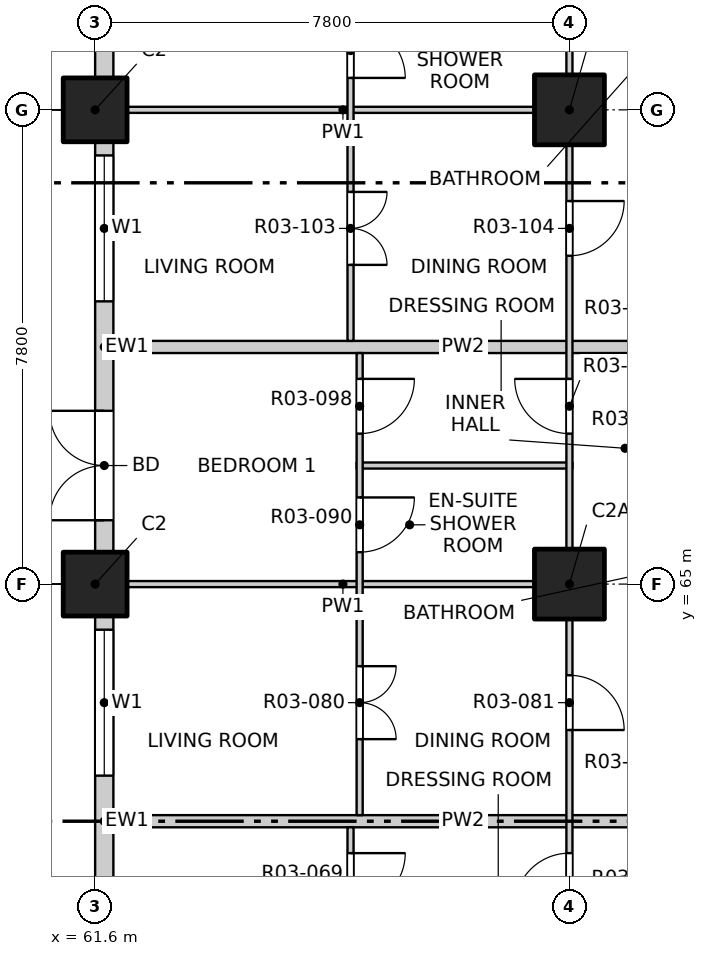
"""IFC4 building model, lengths in metres.
Left out: names, types, materials, properties, quantities, classifications, styles, units other than length and angle.
Written with IfcOpenShell. Run it as: python <this file> out.ifc"""

import sys

from ifc_helpers import new_model, si_unit, direction, frame, frame_2d, origin, origin_2d, place, context, subcontext, project, spatial, rectangle, extrude, element, fill, save


model = new_model("IFC4")
c1 = context("Model", 3, precision=1e-05, world=origin(), true_north=direction((0.0, 1.0)))
c2 = subcontext(c1, "Body", "Model", "MODEL_VIEW")
j1 = project(units=[si_unit("LENGTHUNIT", "METRE"), si_unit("PLANEANGLEUNIT", "RADIAN")], contexts=[c1])
p1 = place(None, origin())
s1 = spatial("IfcSite", under=j1, at=p1, CompositionType="ELEMENT")
p2 = place(p1, origin())
s2 = spatial("IfcBuilding", under=s1, at=p2, CompositionType="ELEMENT")
p3 = place(p2, frame((0.0, 0.0, 43.3)))
s3 = spatial("IfcBuildingStorey", under=s2, at=p3, CompositionType="ELEMENT", Elevation=43.3)
for number, where, z_axis, x_axis in (
    (1, (61.6, 65.0, -0.25), (0.0, 0.0, 1.0), (1.0, 0.0, 0.0)),
    (2, (61.6, 72.8, -0.25), (0.0, 0.0, 1.0), (1.0, 0.0, 0.0)),
):
    element("IfcColumn", number, at=place(p3, frame(where, z_axis=z_axis, x_axis=x_axis)), inside=s3, PredefinedType="COLUMN", context=c2, shape_type="SweptSolid", body=[
        extrude(rectangle(XDim=1.05, YDim=1.05, at=origin_2d()), origin(), (0.0, 0.0, 1.0), 3.35),
    ])
for number, where, z_axis, x_axis in (
    (3, (69.4, 65.0, -0.25), (0.0, 0.0, 1.0), (1.0, 0.0, 0.0)),
    (4, (69.4, 72.8, -0.25), (0.0, 0.0, 1.0), (1.0, 0.0, 0.0)),
):
    element("IfcColumn", number, at=place(p3, frame(where, z_axis=z_axis, x_axis=x_axis)), inside=s3, PredefinedType="COLUMN", context=c2, shape_type="SweptSolid", body=[
        extrude(rectangle(XDim=1.15, YDim=1.15, at=origin_2d()), origin(), (0.0, 0.0, 1.0), 3.35),
    ])
p4 = place(p3, frame((61.75, 57.725, 0.0), z_axis=(0.0, 0.0, 1.0), x_axis=(0.0, 1.0, 0.0)))
e5 = element("IfcWall", 5, at=p4, inside=s3, PredefinedType="SOLIDWALL", context=c2, shape_type="SweptSolid", body=[
    extrude(rectangle(XDim=6.75, YDim=0.3, at=frame_2d((3.375, 0.0))), origin(), (0.0, 0.0, 1.0), 3.1),
])
p5 = place(p4, frame((0.525, 0.0, 0.0)))
e6 = element("IfcOpeningElement", 6, at=p5, cuts=e5, PredefinedType="OPENING", context=c2, shape_type="SweptSolid", body=[
    extrude(rectangle(XDim=1.8, YDim=2.4, at=frame_2d((0.9, 1.2))), frame((0.0, 0.16, 0.0), z_axis=(0.0, -1.0, 0.0), x_axis=(1.0, 0.0, 0.0)), (0.0, 0.0, 1.0), 0.32),
])
p6 = place(p4, frame((4.125, 0.0, 0.9)))
e7 = element("IfcOpeningElement", 7, at=p6, cuts=e5, PredefinedType="OPENING", context=c2, shape_type="SweptSolid", body=[
    extrude(rectangle(XDim=2.4, YDim=1.8, at=frame_2d((1.2, 0.9))), frame((0.0, 0.16, 0.0), z_axis=(0.0, -1.0, 0.0), x_axis=(1.0, 0.0, 0.0)), (0.0, 0.0, 1.0), 0.32),
])
p7 = place(p3, frame((61.75, 65.525, 0.0), z_axis=(0.0, 0.0, 1.0), x_axis=(0.0, 1.0, 0.0)))
e8 = element("IfcWall", 8, at=p7, inside=s3, PredefinedType="SOLIDWALL", context=c2, shape_type="SweptSolid", body=[
    extrude(rectangle(XDim=6.75, YDim=0.3, at=frame_2d((3.375, 0.0))), origin(), (0.0, 0.0, 1.0), 3.1),
])
p8 = place(p7, frame((0.525, 0.0, 0.0)))
e9 = element("IfcOpeningElement", 9, at=p8, cuts=e8, PredefinedType="OPENING", context=c2, shape_type="SweptSolid", body=[
    extrude(rectangle(XDim=1.8, YDim=2.4, at=frame_2d((0.9, 1.2))), frame((0.0, 0.16, 0.0), z_axis=(0.0, -1.0, 0.0), x_axis=(1.0, 0.0, 0.0)), (0.0, 0.0, 1.0), 0.32),
])
p9 = place(p7, frame((4.125, 0.0, 0.9)))
e10 = element("IfcOpeningElement", 10, at=p9, cuts=e8, PredefinedType="OPENING", context=c2, shape_type="SweptSolid", body=[
    extrude(rectangle(XDim=2.4, YDim=1.8, at=frame_2d((1.2, 0.9))), frame((0.0, 0.16, 0.0), z_axis=(0.0, -1.0, 0.0), x_axis=(1.0, 0.0, 0.0)), (0.0, 0.0, 1.0), 0.32),
])
p10 = place(p3, frame((61.75, 73.325, 0.0), z_axis=(0.0, 0.0, 1.0), x_axis=(0.0, 1.0, 0.0)))
e11 = element("IfcWall", 11, at=p10, inside=s3, PredefinedType="SOLIDWALL", context=c2, shape_type="SweptSolid", body=[
    extrude(rectangle(XDim=6.75, YDim=0.3, at=frame_2d((3.375, 0.0))), origin(), (0.0, 0.0, 1.0), 3.1),
])
p11 = place(p10, frame((0.525, 0.0, 0.0)))
e12 = element("IfcOpeningElement", 12, at=p11, cuts=e11, PredefinedType="OPENING", context=c2, shape_type="SweptSolid", body=[
    extrude(rectangle(XDim=1.8, YDim=2.4, at=frame_2d((0.9, 1.2))), frame((0.0, 0.16, 0.0), z_axis=(0.0, -1.0, 0.0), x_axis=(1.0, 0.0, 0.0)), (0.0, 0.0, 1.0), 0.32),
])
p12 = place(p10, frame((4.125, 0.0, 0.9)))
e13 = element("IfcOpeningElement", 13, at=p12, cuts=e11, PredefinedType="OPENING", context=c2, shape_type="SweptSolid", body=[
    extrude(rectangle(XDim=2.4, YDim=1.8, at=frame_2d((1.2, 0.9))), frame((0.0, 0.16, 0.0), z_axis=(0.0, -1.0, 0.0), x_axis=(1.0, 0.0, 0.0)), (0.0, 0.0, 1.0), 0.32),
])
p13 = place(p3, frame((61.9, 61.1, 0.0), z_axis=(0.0, 0.0, 1.0), x_axis=(1.0, 0.0, 0.0)))
e14 = element("IfcWall", 14, at=p13, inside=s3, PredefinedType="PARTITIONING", context=c2, shape_type="SweptSolid", body=[
    extrude(rectangle(XDim=11.5, YDim=0.2, at=frame_2d((5.75, 0.0))), origin(), (0.0, 0.0, 1.0), 3.1),
])
p14 = place(p3, frame((61.9, 65.0, 0.0), z_axis=(0.0, 0.0, 1.0), x_axis=(1.0, 0.0, 0.0)))
e15 = element("IfcWall", 15, at=p14, inside=s3, PredefinedType="PARTITIONING", context=c2, shape_type="SweptSolid", body=[
    extrude(rectangle(XDim=7.55, YDim=0.1, at=frame_2d((3.775, 0.0))), origin(), (0.0, 0.0, 1.0), 3.1),
])
p15 = place(p3, frame((65.9, 66.95, 0.0), z_axis=(0.0, 0.0, 1.0), x_axis=(1.0, 0.0, 0.0)))
e16 = element("IfcWall", 16, at=p15, inside=s3, PredefinedType="PARTITIONING", context=c2, shape_type="SweptSolid", body=[
    extrude(rectangle(XDim=3.55, YDim=0.1, at=frame_2d((1.775, 0.0))), origin(), (0.0, 0.0, 1.0), 3.1),
])
p16 = place(p3, frame((61.9, 68.9, 0.0), z_axis=(0.0, 0.0, 1.0), x_axis=(1.0, 0.0, 0.0)))
e17 = element("IfcWall", 17, at=p16, inside=s3, PredefinedType="PARTITIONING", context=c2, shape_type="SweptSolid", body=[
    extrude(rectangle(XDim=11.5, YDim=0.2, at=frame_2d((5.75, 0.0))), origin(), (0.0, 0.0, 1.0), 3.1),
])
p17 = place(p3, frame((61.9, 72.8, 0.0), z_axis=(0.0, 0.0, 1.0), x_axis=(1.0, 0.0, 0.0)))
e18 = element("IfcWall", 18, at=p17, inside=s3, PredefinedType="PARTITIONING", context=c2, shape_type="SweptSolid", body=[
    extrude(rectangle(XDim=7.55, YDim=0.1, at=frame_2d((3.775, 0.0))), origin(), (0.0, 0.0, 1.0), 3.1),
])
p18 = place(p3, frame((65.8, 41.9, 0.0), z_axis=(0.0, 0.0, 1.0), x_axis=(0.0, 1.0, 0.0)))
e19 = element("IfcWall", 19, at=p18, inside=s3, PredefinedType="PARTITIONING", context=c2, shape_type="SweptSolid", body=[
    extrude(rectangle(XDim=19.1, YDim=0.1, at=frame_2d((9.55, 0.0))), origin(), (0.0, 0.0, 1.0), 3.1),
])
p19 = place(p18, frame((1.05, 0.0, 0.0)))
e20 = element("IfcOpeningElement", 20, at=p19, cuts=e19, PredefinedType="OPENING", context=c2, shape_type="SweptSolid", body=[
    extrude(rectangle(XDim=1.2, YDim=2.1, at=frame_2d((0.6, 1.05))), frame((0.0, 0.06, 0.0), z_axis=(0.0, -1.0, 0.0), x_axis=(1.0, 0.0, 0.0)), (0.0, 0.0, 1.0), 0.12),
])
p20 = place(p18, frame((4.125, 0.0, 0.0)))
e21 = element("IfcOpeningElement", 21, at=p20, cuts=e19, PredefinedType="OPENING", context=c2, shape_type="SweptSolid", body=[
    extrude(rectangle(XDim=0.9, YDim=2.1, at=frame_2d((0.45, 1.05))), frame((0.0, 0.06, 0.0), z_axis=(0.0, -1.0, 0.0), x_axis=(1.0, 0.0, 0.0)), (0.0, 0.0, 1.0), 0.12),
])
p21 = place(p18, frame((6.075, 0.0, 0.0)))
e22 = element("IfcOpeningElement", 22, at=p21, cuts=e19, PredefinedType="OPENING", context=c2, shape_type="SweptSolid", body=[
    extrude(rectangle(XDim=0.9, YDim=2.1, at=frame_2d((0.45, 1.05))), frame((0.0, 0.06, 0.0), z_axis=(0.0, -1.0, 0.0), x_axis=(1.0, 0.0, 0.0)), (0.0, 0.0, 1.0), 0.12),
])
p22 = place(p18, frame((8.85, 0.0, 0.0)))
e23 = element("IfcOpeningElement", 23, at=p22, cuts=e19, PredefinedType="OPENING", context=c2, shape_type="SweptSolid", body=[
    extrude(rectangle(XDim=1.2, YDim=2.1, at=frame_2d((0.6, 1.05))), frame((0.0, 0.06, 0.0), z_axis=(0.0, -1.0, 0.0), x_axis=(1.0, 0.0, 0.0)), (0.0, 0.0, 1.0), 0.12),
])
p23 = place(p18, frame((11.925, 0.0, 0.0)))
e24 = element("IfcOpeningElement", 24, at=p23, cuts=e19, PredefinedType="OPENING", context=c2, shape_type="SweptSolid", body=[
    extrude(rectangle(XDim=0.9, YDim=2.1, at=frame_2d((0.45, 1.05))), frame((0.0, 0.06, 0.0), z_axis=(0.0, -1.0, 0.0), x_axis=(1.0, 0.0, 0.0)), (0.0, 0.0, 1.0), 0.12),
])
p24 = place(p18, frame((13.875, 0.0, 0.0)))
e25 = element("IfcOpeningElement", 25, at=p24, cuts=e19, PredefinedType="OPENING", context=c2, shape_type="SweptSolid", body=[
    extrude(rectangle(XDim=0.9, YDim=2.1, at=frame_2d((0.45, 1.05))), frame((0.0, 0.06, 0.0), z_axis=(0.0, -1.0, 0.0), x_axis=(1.0, 0.0, 0.0)), (0.0, 0.0, 1.0), 0.12),
])
p25 = place(p18, frame((15.825, 0.0, 0.0)))
e26 = element("IfcOpeningElement", 26, at=p25, cuts=e19, PredefinedType="OPENING", context=c2, shape_type="SweptSolid", body=[
    extrude(rectangle(XDim=0.9, YDim=2.1, at=frame_2d((0.45, 1.05))), frame((0.0, 0.06, 0.0), z_axis=(0.0, -1.0, 0.0), x_axis=(1.0, 0.0, 0.0)), (0.0, 0.0, 1.0), 0.12),
])
p26 = place(p18, frame((17.775, 0.0, 0.0)))
e27 = element("IfcOpeningElement", 27, at=p26, cuts=e19, PredefinedType="OPENING", context=c2, shape_type="SweptSolid", body=[
    extrude(rectangle(XDim=0.9, YDim=2.1, at=frame_2d((0.45, 1.05))), frame((0.0, 0.06, 0.0), z_axis=(0.0, -1.0, 0.0), x_axis=(1.0, 0.0, 0.0)), (0.0, 0.0, 1.0), 0.12),
])
p27 = place(p3, frame((65.8, 69.0, 0.0), z_axis=(0.0, 0.0, 1.0), x_axis=(0.0, 1.0, 0.0)))
e28 = element("IfcWall", 28, at=p27, inside=s3, PredefinedType="PARTITIONING", context=c2, shape_type="SweptSolid", body=[
    extrude(rectangle(XDim=7.6, YDim=0.1, at=frame_2d((3.8, 0.0))), origin(), (0.0, 0.0, 1.0), 3.1),
])
p28 = place(p27, frame((1.25, 0.0, 0.0)))
e29 = element("IfcOpeningElement", 29, at=p28, cuts=e28, PredefinedType="OPENING", context=c2, shape_type="SweptSolid", body=[
    extrude(rectangle(XDim=1.2, YDim=2.1, at=frame_2d((0.6, 1.05))), frame((0.0, 0.06, 0.0), z_axis=(0.0, -1.0, 0.0), x_axis=(1.0, 0.0, 0.0)), (0.0, 0.0, 1.0), 0.12),
])
p29 = place(p27, frame((4.325, 0.0, 0.0)))
e30 = element("IfcOpeningElement", 30, at=p29, cuts=e28, PredefinedType="OPENING", context=c2, shape_type="SweptSolid", body=[
    extrude(rectangle(XDim=0.9, YDim=2.1, at=frame_2d((0.45, 1.05))), frame((0.0, 0.06, 0.0), z_axis=(0.0, -1.0, 0.0), x_axis=(1.0, 0.0, 0.0)), (0.0, 0.0, 1.0), 0.12),
])
p30 = place(p27, frame((6.275, 0.0, 0.0)))
e31 = element("IfcOpeningElement", 31, at=p30, cuts=e28, PredefinedType="OPENING", context=c2, shape_type="SweptSolid", body=[
    extrude(rectangle(XDim=0.9, YDim=2.1, at=frame_2d((0.45, 1.05))), frame((0.0, 0.06, 0.0), z_axis=(0.0, -1.0, 0.0), x_axis=(1.0, 0.0, 0.0)), (0.0, 0.0, 1.0), 0.12),
])
p31 = place(p3, frame((65.95, 61.2, 0.0), z_axis=(0.0, 0.0, 1.0), x_axis=(0.0, 1.0, 0.0)))
e32 = element("IfcWall", 32, at=p31, inside=s3, PredefinedType="PARTITIONING", context=c2, shape_type="SweptSolid", body=[
    extrude(rectangle(XDim=7.6, YDim=0.1, at=frame_2d((3.8, 0.0))), origin(), (0.0, 0.0, 1.0), 3.1),
])
p32 = place(p31, frame((1.25, 0.0, 0.0)))
e33 = element("IfcOpeningElement", 33, at=p32, cuts=e32, PredefinedType="OPENING", context=c2, shape_type="SweptSolid", body=[
    extrude(rectangle(XDim=1.2, YDim=2.1, at=frame_2d((0.6, 1.05))), frame((0.0, 0.06, 0.0), z_axis=(0.0, -1.0, 0.0), x_axis=(1.0, 0.0, 0.0)), (0.0, 0.0, 1.0), 0.12),
])
p33 = place(p31, frame((4.325, 0.0, 0.0)))
e34 = element("IfcOpeningElement", 34, at=p33, cuts=e32, PredefinedType="OPENING", context=c2, shape_type="SweptSolid", body=[
    extrude(rectangle(XDim=0.9, YDim=2.1, at=frame_2d((0.45, 1.05))), frame((0.0, 0.06, 0.0), z_axis=(0.0, -1.0, 0.0), x_axis=(1.0, 0.0, 0.0)), (0.0, 0.0, 1.0), 0.12),
])
p34 = place(p31, frame((6.275, 0.0, 0.0)))
e35 = element("IfcOpeningElement", 35, at=p34, cuts=e32, PredefinedType="OPENING", context=c2, shape_type="SweptSolid", body=[
    extrude(rectangle(XDim=0.9, YDim=2.1, at=frame_2d((0.45, 1.05))), frame((0.0, 0.06, 0.0), z_axis=(0.0, -1.0, 0.0), x_axis=(1.0, 0.0, 0.0)), (0.0, 0.0, 1.0), 0.12),
])
p35 = place(p3, frame((69.4, 41.9, 0.0), z_axis=(0.0, 0.0, 1.0), x_axis=(0.0, 1.0, 0.0)))
e36 = element("IfcWall", 36, at=p35, inside=s3, PredefinedType="PARTITIONING", context=c2, shape_type="SweptSolid", body=[
    extrude(rectangle(XDim=46.2, YDim=0.1, at=frame_2d((23.1, 0.0))), origin(), (0.0, 0.0, 1.0), 3.1),
])
p36 = place(p35, frame((1.2, 0.0, 0.0)))
e37 = element("IfcOpeningElement", 37, at=p36, cuts=e36, PredefinedType="OPENING", context=c2, shape_type="SweptSolid", body=[
    extrude(rectangle(XDim=0.9, YDim=2.1, at=frame_2d((0.45, 1.05))), frame((0.0, 0.06, 0.0), z_axis=(0.0, -1.0, 0.0), x_axis=(1.0, 0.0, 0.0)), (0.0, 0.0, 1.0), 0.12),
])
p37 = place(p35, frame((5.9, 0.0, 0.0)))
e38 = element("IfcOpeningElement", 38, at=p37, cuts=e36, PredefinedType="OPENING", context=c2, shape_type="SweptSolid", body=[
    extrude(rectangle(XDim=0.9, YDim=2.1, at=frame_2d((0.45, 1.05))), frame((0.0, 0.06, 0.0), z_axis=(0.0, -1.0, 0.0), x_axis=(1.0, 0.0, 0.0)), (0.0, 0.0, 1.0), 0.12),
])
p38 = place(p35, frame((9.0, 0.0, 0.0)))
e39 = element("IfcOpeningElement", 39, at=p38, cuts=e36, PredefinedType="OPENING", context=c2, shape_type="SweptSolid", body=[
    extrude(rectangle(XDim=0.9, YDim=2.1, at=frame_2d((0.45, 1.05))), frame((0.0, 0.06, 0.0), z_axis=(0.0, -1.0, 0.0), x_axis=(1.0, 0.0, 0.0)), (0.0, 0.0, 1.0), 0.12),
])
p39 = place(p35, frame((13.725, 0.0, 0.0)))
e40 = element("IfcOpeningElement", 40, at=p39, cuts=e36, PredefinedType="OPENING", context=c2, shape_type="SweptSolid", body=[
    extrude(rectangle(XDim=0.9, YDim=2.1, at=frame_2d((0.45, 1.05))), frame((0.0, 0.06, 0.0), z_axis=(0.0, -1.0, 0.0), x_axis=(1.0, 0.0, 0.0)), (0.0, 0.0, 1.0), 0.12),
])
p40 = place(p35, frame((17.775, 0.0, 0.0)))
e41 = element("IfcOpeningElement", 41, at=p40, cuts=e36, PredefinedType="OPENING", context=c2, shape_type="SweptSolid", body=[
    extrude(rectangle(XDim=0.9, YDim=2.1, at=frame_2d((0.45, 1.05))), frame((0.0, 0.06, 0.0), z_axis=(0.0, -1.0, 0.0), x_axis=(1.0, 0.0, 0.0)), (0.0, 0.0, 1.0), 0.12),
])
p41 = place(p35, frame((20.7, 0.0, 0.0)))
e42 = element("IfcOpeningElement", 42, at=p41, cuts=e36, PredefinedType="OPENING", context=c2, shape_type="SweptSolid", body=[
    extrude(rectangle(XDim=0.9, YDim=2.1, at=frame_2d((0.45, 1.05))), frame((0.0, 0.06, 0.0), z_axis=(0.0, -1.0, 0.0), x_axis=(1.0, 0.0, 0.0)), (0.0, 0.0, 1.0), 0.12),
])
p42 = place(p35, frame((25.575, 0.0, 0.0)))
e43 = element("IfcOpeningElement", 43, at=p42, cuts=e36, PredefinedType="OPENING", context=c2, shape_type="SweptSolid", body=[
    extrude(rectangle(XDim=0.9, YDim=2.1, at=frame_2d((0.45, 1.05))), frame((0.0, 0.06, 0.0), z_axis=(0.0, -1.0, 0.0), x_axis=(1.0, 0.0, 0.0)), (0.0, 0.0, 1.0), 0.12),
])
p43 = place(p35, frame((28.5, 0.0, 0.0)))
e44 = element("IfcOpeningElement", 44, at=p43, cuts=e36, PredefinedType="OPENING", context=c2, shape_type="SweptSolid", body=[
    extrude(rectangle(XDim=0.9, YDim=2.1, at=frame_2d((0.45, 1.05))), frame((0.0, 0.06, 0.0), z_axis=(0.0, -1.0, 0.0), x_axis=(1.0, 0.0, 0.0)), (0.0, 0.0, 1.0), 0.12),
])
p44 = place(p35, frame((33.375, 0.0, 0.0)))
e45 = element("IfcOpeningElement", 45, at=p44, cuts=e36, PredefinedType="OPENING", context=c2, shape_type="SweptSolid", body=[
    extrude(rectangle(XDim=0.9, YDim=2.1, at=frame_2d((0.45, 1.05))), frame((0.0, 0.06, 0.0), z_axis=(0.0, -1.0, 0.0), x_axis=(1.0, 0.0, 0.0)), (0.0, 0.0, 1.0), 0.12),
])
p45 = place(p35, frame((36.3, 0.0, 0.0)))
e46 = element("IfcOpeningElement", 46, at=p45, cuts=e36, PredefinedType="OPENING", context=c2, shape_type="SweptSolid", body=[
    extrude(rectangle(XDim=0.9, YDim=2.1, at=frame_2d((0.45, 1.05))), frame((0.0, 0.06, 0.0), z_axis=(0.0, -1.0, 0.0), x_axis=(1.0, 0.0, 0.0)), (0.0, 0.0, 1.0), 0.12),
])
p46 = place(p35, frame((40.2, 0.0, 0.0)))
e47 = element("IfcOpeningElement", 47, at=p46, cuts=e36, PredefinedType="OPENING", context=c2, shape_type="SweptSolid", body=[
    extrude(rectangle(XDim=0.9, YDim=2.1, at=frame_2d((0.45, 1.05))), frame((0.0, 0.06, 0.0), z_axis=(0.0, -1.0, 0.0), x_axis=(1.0, 0.0, 0.0)), (0.0, 0.0, 1.0), 0.12),
])
p47 = place(p35, frame((44.1, 0.0, 0.0)))
e48 = element("IfcOpeningElement", 48, at=p47, cuts=e36, PredefinedType="OPENING", context=c2, shape_type="SweptSolid", body=[
    extrude(rectangle(XDim=0.9, YDim=2.1, at=frame_2d((0.45, 1.05))), frame((0.0, 0.06, 0.0), z_axis=(0.0, -1.0, 0.0), x_axis=(1.0, 0.0, 0.0)), (0.0, 0.0, 1.0), 0.12),
])
p48 = place(p6, origin())
e49 = element("IfcWindow", 49, at=p48, inside=s3, PartitioningType="DOUBLE_PANEL_VERTICAL", PredefinedType="WINDOW", context=c2, shape_type="SweptSolid", body=[
    extrude(rectangle(XDim=2.4, YDim=1.8, at=frame_2d((1.2, 0.9))), frame((0.0, 0.03, 0.0), z_axis=(0.0, -1.0, 0.0), x_axis=(1.0, 0.0, 0.0)), (0.0, 0.0, 1.0), 0.06),
])
fill(e7, e49)
p49 = place(p8, origin())
e50 = element("IfcDoor", 50, at=p49, inside=s3, OperationType="DOUBLE_DOOR_SINGLE_SWING", PredefinedType="DOOR", context=c2, shape_type="SweptSolid", body=[
    extrude(rectangle(XDim=1.8, YDim=2.4, at=frame_2d((0.9, 1.2))), frame((0.0, 0.025, 0.0), z_axis=(0.0, -1.0, 0.0), x_axis=(1.0, 0.0, 0.0)), (0.0, 0.0, 1.0), 0.05),
])
fill(e9, e50)
p50 = place(p9, origin())
e51 = element("IfcWindow", 51, at=p50, inside=s3, PartitioningType="DOUBLE_PANEL_VERTICAL", PredefinedType="WINDOW", context=c2, shape_type="SweptSolid", body=[
    extrude(rectangle(XDim=2.4, YDim=1.8, at=frame_2d((1.2, 0.9))), frame((0.0, 0.03, 0.0), z_axis=(0.0, -1.0, 0.0), x_axis=(1.0, 0.0, 0.0)), (0.0, 0.0, 1.0), 0.06),
])
fill(e10, e51)
p51 = place(p26, origin())
e52 = element("IfcDoor", 52, at=p51, inside=s3, OperationType="SINGLE_SWING_LEFT", PredefinedType="DOOR", context=c2, shape_type="SweptSolid", body=[
    extrude(rectangle(XDim=0.9, YDim=2.1, at=frame_2d((0.45, 1.05))), frame((0.0, 0.025, 0.0), z_axis=(0.0, -1.0, 0.0), x_axis=(1.0, 0.0, 0.0)), (0.0, 0.0, 1.0), 0.05),
])
fill(e27, e52)
p52 = place(p40, origin())
e53 = element("IfcDoor", 53, at=p52, inside=s3, OperationType="SINGLE_SWING_LEFT", PredefinedType="DOOR", context=c2, shape_type="SweptSolid", body=[
    extrude(rectangle(XDim=0.9, YDim=2.1, at=frame_2d((0.45, 1.05))), frame((0.0, 0.025, 0.0), z_axis=(0.0, -1.0, 0.0), x_axis=(1.0, 0.0, 0.0)), (0.0, 0.0, 1.0), 0.05),
])
fill(e41, e53)
p53 = place(p32, origin())
e54 = element("IfcDoor", 54, at=p53, inside=s3, OperationType="DOUBLE_DOOR_SINGLE_SWING", PredefinedType="DOOR", context=c2, shape_type="SweptSolid", body=[
    extrude(rectangle(XDim=1.2, YDim=2.1, at=frame_2d((0.6, 1.05))), frame((0.0, 0.025, 0.0), z_axis=(0.0, -1.0, 0.0), x_axis=(1.0, 0.0, 0.0)), (0.0, 0.0, 1.0), 0.05),
])
fill(e33, e54)
p54 = place(p41, origin())
e55 = element("IfcDoor", 55, at=p54, inside=s3, OperationType="SINGLE_SWING_RIGHT", PredefinedType="DOOR", context=c2, shape_type="SweptSolid", body=[
    extrude(rectangle(XDim=0.9, YDim=2.1, at=frame_2d((0.45, 1.05))), frame((0.0, 0.025, 0.0), z_axis=(0.0, -1.0, 0.0), x_axis=(1.0, 0.0, 0.0)), (0.0, 0.0, 1.0), 0.05),
])
fill(e42, e55)
p55 = place(p33, origin())
e56 = element("IfcDoor", 56, at=p55, inside=s3, OperationType="SINGLE_SWING_LEFT", PredefinedType="DOOR", context=c2, shape_type="SweptSolid", body=[
    extrude(rectangle(XDim=0.9, YDim=2.1, at=frame_2d((0.45, 1.05))), frame((0.0, 0.025, 0.0), z_axis=(0.0, -1.0, 0.0), x_axis=(1.0, 0.0, 0.0)), (0.0, 0.0, 1.0), 0.05),
])
fill(e34, e56)
p56 = place(p34, origin())
e57 = element("IfcDoor", 57, at=p56, inside=s3, OperationType="SINGLE_SWING_LEFT", PredefinedType="DOOR", context=c2, shape_type="SweptSolid", body=[
    extrude(rectangle(XDim=0.9, YDim=2.1, at=frame_2d((0.45, 1.05))), frame((0.0, 0.025, 0.0), z_axis=(0.0, -1.0, 0.0), x_axis=(1.0, 0.0, 0.0)), (0.0, 0.0, 1.0), 0.05),
])
fill(e35, e57)
p57 = place(p42, origin())
e58 = element("IfcDoor", 58, at=p57, inside=s3, OperationType="SINGLE_SWING_RIGHT", PredefinedType="DOOR", context=c2, shape_type="SweptSolid", body=[
    extrude(rectangle(XDim=0.9, YDim=2.1, at=frame_2d((0.45, 1.05))), frame((0.0, 0.025, 0.0), z_axis=(0.0, -1.0, 0.0), x_axis=(1.0, 0.0, 0.0)), (0.0, 0.0, 1.0), 0.05),
])
fill(e43, e58)
p58 = place(p28, origin())
e59 = element("IfcDoor", 59, at=p58, inside=s3, OperationType="DOUBLE_DOOR_SINGLE_SWING", PredefinedType="DOOR", context=c2, shape_type="SweptSolid", body=[
    extrude(rectangle(XDim=1.2, YDim=2.1, at=frame_2d((0.6, 1.05))), frame((0.0, 0.025, 0.0), z_axis=(0.0, -1.0, 0.0), x_axis=(1.0, 0.0, 0.0)), (0.0, 0.0, 1.0), 0.05),
])
fill(e29, e59)
p59 = place(p43, origin())
e60 = element("IfcDoor", 60, at=p59, inside=s3, OperationType="SINGLE_SWING_LEFT", PredefinedType="DOOR", context=c2, shape_type="SweptSolid", body=[
    extrude(rectangle(XDim=0.9, YDim=2.1, at=frame_2d((0.45, 1.05))), frame((0.0, 0.025, 0.0), z_axis=(0.0, -1.0, 0.0), x_axis=(1.0, 0.0, 0.0)), (0.0, 0.0, 1.0), 0.05),
])
fill(e44, e60)
p60 = place(p29, origin())
e61 = element("IfcDoor", 61, at=p60, inside=s3, OperationType="SINGLE_SWING_RIGHT", PredefinedType="DOOR", context=c2, shape_type="SweptSolid", body=[
    extrude(rectangle(XDim=0.9, YDim=2.1, at=frame_2d((0.45, 1.05))), frame((0.0, 0.025, 0.0), z_axis=(0.0, -1.0, 0.0), x_axis=(1.0, 0.0, 0.0)), (0.0, 0.0, 1.0), 0.05),
])
fill(e30, e61)
save(model, sys.argv[1])
